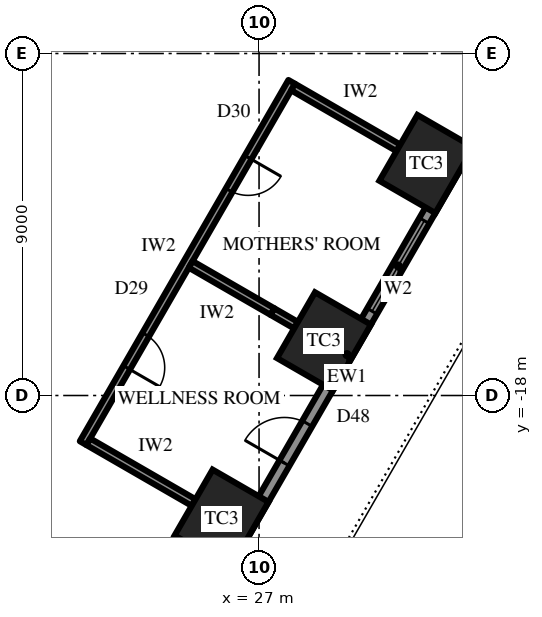
"""IFC4 building model, lengths in metres.
Left out: names, types, materials, properties, quantities, classifications, styles, units other than length and angle.
Written with IfcOpenShell. Run it as: python <this file> out.ifc"""

import sys

from ifc_helpers import new_model, si_unit, direction, frame, frame_2d, origin, origin_2d, place, context, subcontext, project, spatial, rectangle, extrude, element, fill, save


model = new_model("IFC4")
c1 = context("Model", 3, precision=1e-05, world=origin(), true_north=direction((0.0, 1.0)))
c2 = subcontext(c1, "Body", "Model", "MODEL_VIEW")
j1 = project(units=[si_unit("LENGTHUNIT", "METRE"), si_unit("PLANEANGLEUNIT", "RADIAN")], contexts=[c1])
p1 = place(None, origin())
s1 = spatial("IfcSite", under=j1, at=p1, CompositionType="ELEMENT")
p2 = place(p1, origin())
s2 = spatial("IfcBuilding", under=s1, at=p2, CompositionType="ELEMENT")
p3 = place(p2, frame((0.0, 0.0, 78.1)))
s3 = spatial("IfcBuildingStorey", under=s2, at=p3, CompositionType="ELEMENT", Elevation=78.1)
for number, where, z_axis, x_axis in (
    (1, (26.014, -21.242, 0.0), (0.0, 0.0, 1.0), (0.5, 0.866, 0.0)),
    (2, (28.709, -16.575, 0.0), (0.0, 0.0, 1.0), (0.5, 0.866, 0.0)),
    (3, (31.403, -11.908, 0.0), (0.0, 0.0, 1.0), (0.5, 0.866, 0.0)),
):
    element("IfcColumn", number, at=place(p3, frame(where, z_axis=z_axis, x_axis=x_axis)), inside=s3, PredefinedType="COLUMN", context=c2, shape_type="SweptSolid", body=[
        extrude(rectangle(XDim=2.0, YDim=1.7, at=origin_2d()), origin(), (0.0, 0.0, 1.0), 4.2),
    ])
p4 = place(p3, frame((21.232, -30.925, 0.0), z_axis=(0.0, 0.0, 1.0), x_axis=(0.499999163675, 0.866025886636, 0.0)))
e4 = element("IfcWall", 4, at=p4, inside=s3, PredefinedType="SOLIDWALL", context=c2, shape_type="SweptSolid", body=[
    extrude(rectangle(XDim=32.332, YDim=0.3, at=frame_2d((16.166, 0.0))), origin(), (0.0, 0.0, 1.0), 2.7),
])
p5 = place(p4, frame((1.319, 0.0, 0.6)))
e5 = element("IfcOpeningElement", 5, at=p5, cuts=e4, PredefinedType="OPENING", context=c2, shape_type="SweptSolid", body=[
    extrude(rectangle(XDim=2.75, YDim=1.85, at=frame_2d((1.375, 0.925))), frame((0.0, 0.16, 0.0), z_axis=(0.0, -1.0, 0.0), x_axis=(1.0, 0.0, 0.0)), (0.0, 0.0, 1.0), 0.32),
])
p6 = place(p4, frame((6.708, 0.0, 0.6)))
e6 = element("IfcOpeningElement", 6, at=p6, cuts=e4, PredefinedType="OPENING", context=c2, shape_type="SweptSolid", body=[
    extrude(rectangle(XDim=2.75, YDim=1.85, at=frame_2d((1.375, 0.925))), frame((0.0, 0.16, 0.0), z_axis=(0.0, -1.0, 0.0), x_axis=(1.0, 0.0, 0.0)), (0.0, 0.0, 1.0), 0.32),
])
p7 = place(p4, frame((12.872, 0.0, 0.0)))
e7 = element("IfcOpeningElement", 7, at=p7, cuts=e4, PredefinedType="OPENING", context=c2, shape_type="SweptSolid", body=[
    extrude(rectangle(XDim=1.2, YDim=2.4, at=frame_2d((0.6, 1.2))), frame((0.0, 0.16, 0.0), z_axis=(0.0, -1.0, 0.0), x_axis=(1.0, 0.0, 0.0)), (0.0, 0.0, 1.0), 0.32),
])
p8 = place(p4, frame((17.485, 0.0, 0.6)))
e8 = element("IfcOpeningElement", 8, at=p8, cuts=e4, PredefinedType="OPENING", context=c2, shape_type="SweptSolid", body=[
    extrude(rectangle(XDim=2.75, YDim=1.85, at=frame_2d((1.375, 0.925))), frame((0.0, 0.16, 0.0), z_axis=(0.0, -1.0, 0.0), x_axis=(1.0, 0.0, 0.0)), (0.0, 0.0, 1.0), 0.32),
])
p9 = place(p4, frame((22.874, 0.0, 0.6)))
e9 = element("IfcOpeningElement", 9, at=p9, cuts=e4, PredefinedType="OPENING", context=c2, shape_type="SweptSolid", body=[
    extrude(rectangle(XDim=2.75, YDim=1.85, at=frame_2d((1.375, 0.925))), frame((0.0, 0.16, 0.0), z_axis=(0.0, -1.0, 0.0), x_axis=(1.0, 0.0, 0.0)), (0.0, 0.0, 1.0), 0.32),
])
p10 = place(p4, frame((28.262, 0.0, 0.6)))
e10 = element("IfcOpeningElement", 10, at=p10, cuts=e4, PredefinedType="OPENING", context=c2, shape_type="SweptSolid", body=[
    extrude(rectangle(XDim=2.75, YDim=1.85, at=frame_2d((1.375, 0.925))), frame((0.0, 0.16, 0.0), z_axis=(0.0, -1.0, 0.0), x_axis=(1.0, 0.0, 0.0)), (0.0, 0.0, 1.0), 0.32),
])
p11 = place(p3, frame((22.37, -19.253, 0.0), z_axis=(0.0, 0.0, 1.0), x_axis=(0.500018936051, 0.866014470774, 0.0)))
e11 = element("IfcWall", 11, at=p11, inside=s3, PredefinedType="PARTITIONING", context=c2, shape_type="SweptSolid", body=[
    extrude(rectangle(XDim=10.977, YDim=0.2, at=frame_2d((5.489, 0.0))), origin(), (0.0, 0.0, 1.0), 4.0),
])
p12 = place(p11, frame((2.294, 0.0, 0.0)))
e12 = element("IfcOpeningElement", 12, at=p12, cuts=e11, PredefinedType="OPENING", context=c2, shape_type="SweptSolid", body=[
    extrude(rectangle(XDim=1.0, YDim=2.2, at=frame_2d((0.5, 1.1))), frame((0.0, 0.11, 0.0), z_axis=(0.0, -1.0, 0.0), x_axis=(1.0, 0.0, 0.0)), (0.0, 0.0, 1.0), 0.22),
])
p13 = place(p11, frame((7.683, 0.0, 0.0)))
e13 = element("IfcOpeningElement", 13, at=p13, cuts=e11, PredefinedType="OPENING", context=c2, shape_type="SweptSolid", body=[
    extrude(rectangle(XDim=1.0, YDim=2.2, at=frame_2d((0.5, 1.1))), frame((0.0, 0.11, 0.0), z_axis=(0.0, -1.0, 0.0), x_axis=(1.0, 0.0, 0.0)), (0.0, 0.0, 1.0), 0.22),
])
p14 = place(p3, frame((22.507, -19.217, 0.0), z_axis=(0.0, 0.0, 1.0), x_axis=(0.866008981251, -0.500028443584, 0.0)))
e14 = element("IfcWall", 14, at=p14, inside=s3, PredefinedType="PARTITIONING", context=c2, shape_type="SweptSolid", body=[
    extrude(rectangle(XDim=3.2, YDim=0.2, at=frame_2d((1.6, 0.0))), origin(), (0.0, 0.0, 1.0), 2.992),
])
p15 = place(p3, frame((25.201, -14.55, 0.0), z_axis=(0.0, 0.0, 1.0), x_axis=(0.866020232408, -0.500008956979, 0.0)))
e15 = element("IfcWall", 15, at=p15, inside=s3, PredefinedType="PARTITIONING", context=c2, shape_type="SweptSolid", body=[
    extrude(rectangle(XDim=2.483, YDim=0.2, at=frame_2d((1.242, 0.0))), origin(), (0.0, 0.0, 1.0), 4.0),
])
p16 = place(p3, frame((27.352, -15.792, 0.0), z_axis=(0.0, 0.0, 1.0), x_axis=(0.866117509073, -0.499840435016, 0.0)))
e16 = element("IfcWall", 16, at=p16, inside=s3, PredefinedType="PARTITIONING", context=c2, shape_type="SweptSolid", body=[
    extrude(rectangle(XDim=0.717, YDim=0.2, at=frame_2d((0.358, 0.0))), origin(), (0.0, 0.0, 1.0), 2.992),
])
p17 = place(p3, frame((27.896, -9.883, 0.0), z_axis=(0.0, 0.0, 1.0), x_axis=(0.866008981251, -0.500028443584, 0.0)))
e17 = element("IfcWall", 17, at=p17, inside=s3, PredefinedType="PARTITIONING", context=c2, shape_type="SweptSolid", body=[
    extrude(rectangle(XDim=3.2, YDim=0.2, at=frame_2d((1.6, 0.0))), origin(), (0.0, 0.0, 1.0), 2.944),
])
p18 = place(p7, origin())
e18 = element("IfcDoor", 18, at=p18, inside=s3, OperationType="SINGLE_SWING_RIGHT", PredefinedType="DOOR", context=c2, shape_type="SweptSolid", body=[
    extrude(rectangle(XDim=1.2, YDim=2.4, at=frame_2d((0.6, 1.2))), frame((0.0, 0.025, 0.0), z_axis=(0.0, -1.0, 0.0), x_axis=(1.0, 0.0, 0.0)), (0.0, 0.0, 1.0), 0.05),
])
fill(e7, e18)
p19 = place(p8, origin())
e19 = element("IfcWindow", 19, at=p19, inside=s3, PartitioningType="SINGLE_PANEL", PredefinedType="WINDOW", context=c2, shape_type="SweptSolid", body=[
    extrude(rectangle(XDim=2.75, YDim=1.85, at=frame_2d((1.375, 0.925))), frame((0.0, 0.03, 0.0), z_axis=(0.0, -1.0, 0.0), x_axis=(1.0, 0.0, 0.0)), (0.0, 0.0, 1.0), 0.06),
])
fill(e8, e19)
p20 = place(p12, frame((1.0, 0.0, 0.0), z_axis=(0.0, 0.0, 1.0), x_axis=(-1.0, 0.0, 0.0)))
e20 = element("IfcDoor", 20, at=p20, inside=s3, OperationType="SINGLE_SWING_LEFT", PredefinedType="DOOR", context=c2, shape_type="SweptSolid", body=[
    extrude(rectangle(XDim=1.0, YDim=2.2, at=frame_2d((0.5, 1.1))), frame((0.0, 0.025, 0.0), z_axis=(0.0, -1.0, 0.0), x_axis=(1.0, 0.0, 0.0)), (0.0, 0.0, 1.0), 0.05),
])
fill(e12, e20)
p21 = place(p13, frame((1.0, 0.0, 0.0), z_axis=(0.0, 0.0, 1.0), x_axis=(-1.0, 0.0, 0.0)))
e21 = element("IfcDoor", 21, at=p21, inside=s3, OperationType="SINGLE_SWING_RIGHT", PredefinedType="DOOR", context=c2, shape_type="SweptSolid", body=[
    extrude(rectangle(XDim=1.0, YDim=2.2, at=frame_2d((0.5, 1.1))), frame((0.0, 0.025, 0.0), z_axis=(0.0, -1.0, 0.0), x_axis=(1.0, 0.0, 0.0)), (0.0, 0.0, 1.0), 0.05),
])
fill(e13, e21)
save(model, sys.argv[1])
